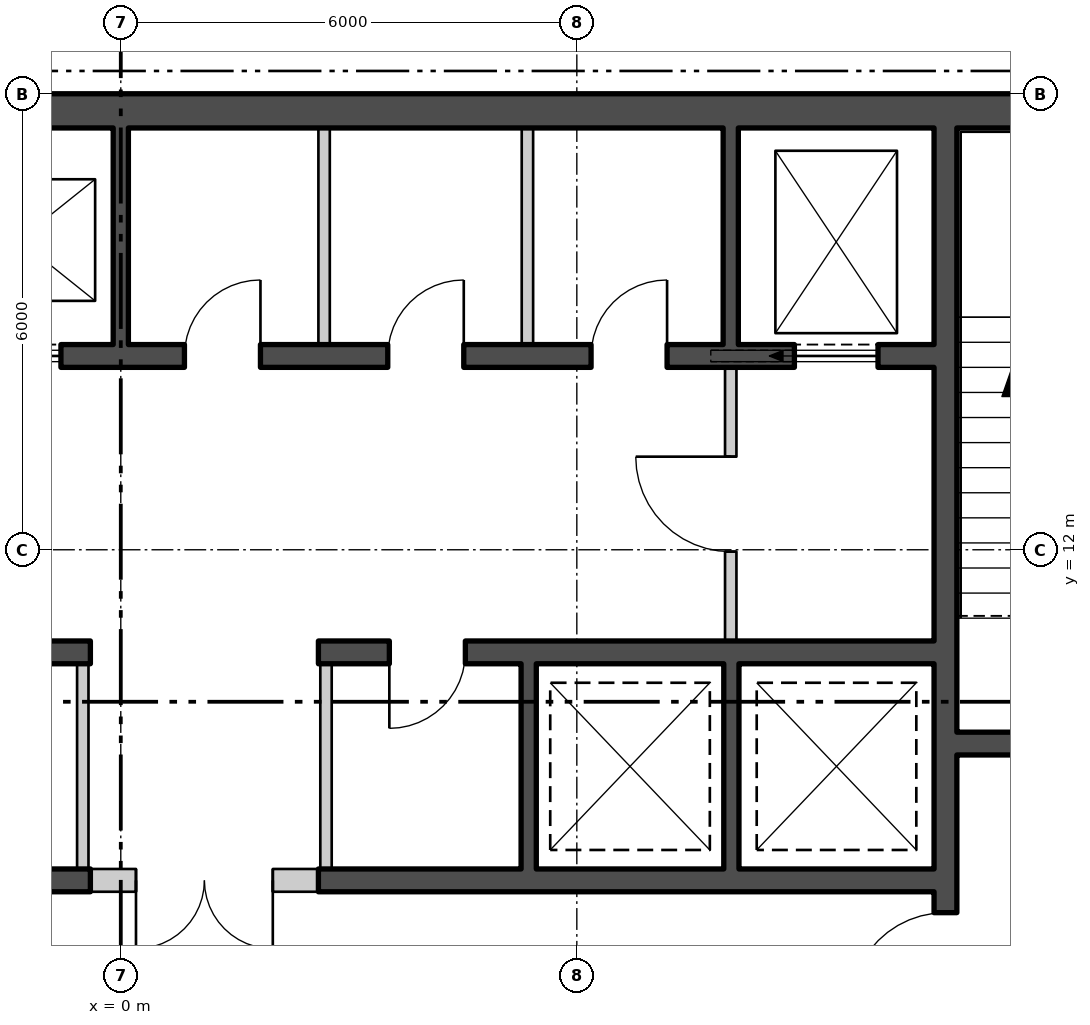
"""IFC4 building model, lengths in metres.
Left out: names, types, materials, properties, quantities, classifications, styles, units other than length and angle.
Written with IfcOpenShell. Run it as: python <this file> out.ifc"""

import sys

from ifc_helpers import new_model, si_unit, direction, frame, frame_2d, origin, place, context, subcontext, project, spatial, polyline, rectangle, outline, extrude, element, fill, save


model = new_model("IFC4")
c1 = context("Model", 3, precision=1e-05, world=origin(), true_north=direction((0.0, 1.0)))
c2 = subcontext(c1, "Body", "Model", "MODEL_VIEW")
j1 = project(units=[si_unit("LENGTHUNIT", "METRE"), si_unit("PLANEANGLEUNIT", "RADIAN")], contexts=[c1])
p1 = place(None, origin())
s1 = spatial("IfcSite", under=j1, at=p1, CompositionType="ELEMENT")
p2 = place(p1, origin())
s2 = spatial("IfcBuilding", under=s1, at=p2, CompositionType="ELEMENT")
p3 = place(p2, frame((0.0, 0.0, 192.6)))
s3 = spatial("IfcBuildingStorey", under=s2, at=p3, CompositionType="ELEMENT", Elevation=192.6)
p4 = place(p3, frame((3.67, -25.994, -0.18), z_axis=(0.0, 0.0, 1.0), x_axis=(0.499999764979, 0.866025539474, 0.0)))
e1 = element("IfcWall", 1, at=p4, inside=s3, PredefinedType="SOLIDWALL", context=c2, shape_type="SweptSolid", body=[
    extrude(outline(polyline([(-0.13, -0.225), (45.87, -0.225), (45.61, 0.225), (0.13, 0.225), (-0.13, -0.225)])), origin(), (0.0, 0.0, 1.0), 3.68),
])
p5 = place(p4, frame((1.424, 0.0, 1.08)))
e2 = element("IfcOpeningElement", 2, at=p5, cuts=e1, PredefinedType="OPENING", context=c2, shape_type="SweptSolid", body=[
    extrude(rectangle(XDim=2.4, YDim=2.0, at=frame_2d((1.2, 1.0))), frame((0.0, 0.235, 0.0), z_axis=(0.0, -1.0, 0.0), x_axis=(1.0, 0.0, 0.0)), (0.0, 0.0, 1.0), 0.47),
])
p6 = place(p4, frame((5.893, 0.0, 1.08)))
e3 = element("IfcOpeningElement", 3, at=p6, cuts=e1, PredefinedType="OPENING", context=c2, shape_type="SweptSolid", body=[
    extrude(rectangle(XDim=2.4, YDim=2.0, at=frame_2d((1.2, 1.0))), frame((0.0, 0.235, 0.0), z_axis=(0.0, -1.0, 0.0), x_axis=(1.0, 0.0, 0.0)), (0.0, 0.0, 1.0), 0.47),
])
p7 = place(p4, frame((10.401, 0.0, 1.08)))
e4 = element("IfcOpeningElement", 4, at=p7, cuts=e1, PredefinedType="OPENING", context=c2, shape_type="SweptSolid", body=[
    extrude(rectangle(XDim=2.4, YDim=2.0, at=frame_2d((1.2, 1.0))), frame((0.0, 0.235, 0.0), z_axis=(0.0, -1.0, 0.0), x_axis=(1.0, 0.0, 0.0)), (0.0, 0.0, 1.0), 0.47),
])
p8 = place(p4, frame((14.909, 0.0, 1.08)))
e5 = element("IfcOpeningElement", 5, at=p8, cuts=e1, PredefinedType="OPENING", context=c2, shape_type="SweptSolid", body=[
    extrude(rectangle(XDim=2.4, YDim=2.0, at=frame_2d((1.2, 1.0))), frame((0.0, 0.235, 0.0), z_axis=(0.0, -1.0, 0.0), x_axis=(1.0, 0.0, 0.0)), (0.0, 0.0, 1.0), 0.47),
])
p9 = place(p4, frame((19.416, 0.0, 1.08)))
e6 = element("IfcOpeningElement", 6, at=p9, cuts=e1, PredefinedType="OPENING", context=c2, shape_type="SweptSolid", body=[
    extrude(rectangle(XDim=2.4, YDim=2.0, at=frame_2d((1.2, 1.0))), frame((0.0, 0.235, 0.0), z_axis=(0.0, -1.0, 0.0), x_axis=(1.0, 0.0, 0.0)), (0.0, 0.0, 1.0), 0.47),
])
p10 = place(p4, frame((23.924, 0.0, 1.08)))
e7 = element("IfcOpeningElement", 7, at=p10, cuts=e1, PredefinedType="OPENING", context=c2, shape_type="SweptSolid", body=[
    extrude(rectangle(XDim=2.4, YDim=2.0, at=frame_2d((1.2, 1.0))), frame((0.0, 0.235, 0.0), z_axis=(0.0, -1.0, 0.0), x_axis=(1.0, 0.0, 0.0)), (0.0, 0.0, 1.0), 0.47),
])
p11 = place(p4, frame((28.431, 0.0, 1.08)))
e8 = element("IfcOpeningElement", 8, at=p11, cuts=e1, PredefinedType="OPENING", context=c2, shape_type="SweptSolid", body=[
    extrude(rectangle(XDim=2.4, YDim=2.0, at=frame_2d((1.2, 1.0))), frame((0.0, 0.235, 0.0), z_axis=(0.0, -1.0, 0.0), x_axis=(1.0, 0.0, 0.0)), (0.0, 0.0, 1.0), 0.47),
])
p12 = place(p4, frame((32.939, 0.0, 1.08)))
e9 = element("IfcOpeningElement", 9, at=p12, cuts=e1, PredefinedType="OPENING", context=c2, shape_type="SweptSolid", body=[
    extrude(rectangle(XDim=2.4, YDim=2.0, at=frame_2d((1.2, 1.0))), frame((0.0, 0.235, 0.0), z_axis=(0.0, -1.0, 0.0), x_axis=(1.0, 0.0, 0.0)), (0.0, 0.0, 1.0), 0.47),
])
p13 = place(p4, frame((37.447, 0.0, 1.08)))
e10 = element("IfcOpeningElement", 10, at=p13, cuts=e1, PredefinedType="OPENING", context=c2, shape_type="SweptSolid", body=[
    extrude(rectangle(XDim=2.4, YDim=2.0, at=frame_2d((1.2, 1.0))), frame((0.0, 0.235, 0.0), z_axis=(0.0, -1.0, 0.0), x_axis=(1.0, 0.0, 0.0)), (0.0, 0.0, 1.0), 0.47),
])
p14 = place(p4, frame((41.916, 0.0, 1.08)))
e11 = element("IfcOpeningElement", 11, at=p14, cuts=e1, PredefinedType="OPENING", context=c2, shape_type="SweptSolid", body=[
    extrude(rectangle(XDim=2.4, YDim=2.0, at=frame_2d((1.2, 1.0))), frame((0.0, 0.235, 0.0), z_axis=(0.0, -1.0, 0.0), x_axis=(1.0, 0.0, 0.0)), (0.0, 0.0, 1.0), 0.47),
])
p15 = place(p3, frame((-16.2, 17.775, 0.0), z_axis=(0.0, 0.0, 1.0), x_axis=(1.0, 0.0, 0.0)))
e12 = element("IfcWall", 12, at=p15, inside=s3, PredefinedType="SHEAR", context=c2, shape_type="SweptSolid", body=[
    extrude(rectangle(XDim=32.4, YDim=0.45, at=frame_2d((16.2, 0.0))), origin(), (0.0, 0.0, 1.0), 3.7),
])
p16 = place(p3, frame((10.85, 2.45, 0.0), z_axis=(0.0, 0.0, 1.0), x_axis=(0.0, 1.0, 0.0)))
e13 = element("IfcWall", 13, at=p16, inside=s3, PredefinedType="SHEAR", context=c2, shape_type="SweptSolid", body=[
    extrude(rectangle(XDim=15.1, YDim=0.3, at=frame_2d((7.55, 0.0))), origin(), (0.0, 0.0, 1.0), 3.7),
])
p17 = place(p16, frame((3.525, 0.0, 0.0)))
e14 = element("IfcOpeningElement", 14, at=p17, cuts=e13, PredefinedType="OPENING", context=c2, shape_type="SweptSolid", body=[
    extrude(rectangle(XDim=1.25, YDim=2.1, at=frame_2d((0.625, 1.05))), frame((0.0, 0.16, 0.0), z_axis=(0.0, -1.0, 0.0), x_axis=(1.0, 0.0, 0.0)), (0.0, 0.0, 1.0), 0.32),
])
p18 = place(p16, frame((1.15, 0.0, 0.0)))
e15 = element("IfcOpeningElement", 15, at=p18, cuts=e13, PredefinedType="OPENING", context=c2, shape_type="SweptSolid", body=[
    extrude(rectangle(XDim=1.0, YDim=2.1, at=frame_2d((0.5, 1.05))), frame((0.0, 0.16, 0.0), z_axis=(0.0, -1.0, 0.0), x_axis=(1.0, 0.0, 0.0)), (0.0, 0.0, 1.0), 0.32),
])
p19 = place(p3, frame((11.0, 9.45, 0.0), z_axis=(0.0, 0.0, 1.0), x_axis=(1.0, 0.0, 0.0)))
e16 = element("IfcWall", 16, at=p19, inside=s3, PredefinedType="SHEAR", context=c2, shape_type="SweptSolid", body=[
    extrude(rectangle(XDim=3.2, YDim=0.3, at=frame_2d((1.6, 0.0))), origin(), (0.0, 0.0, 1.0), 3.7),
])
p20 = place(p19, frame((1.0, 0.0, 0.0)))
e17 = element("IfcOpeningElement", 17, at=p20, cuts=e16, PredefinedType="OPENING", context=c2, shape_type="SweptSolid", body=[
    extrude(rectangle(XDim=1.2, YDim=2.1, at=frame_2d((0.6, 1.05))), frame((0.0, 0.16, 0.0), z_axis=(0.0, -1.0, 0.0), x_axis=(1.0, 0.0, 0.0)), (0.0, 0.0, 1.0), 0.32),
])
p21 = place(p3, frame((-10.7, 14.55, 0.0), z_axis=(0.0, 0.0, 1.0), x_axis=(1.0, 0.0, 0.0)))
e18 = element("IfcWall", 18, at=p21, inside=s3, PredefinedType="SHEAR", context=c2, shape_type="SweptSolid", body=[
    extrude(rectangle(XDim=21.4, YDim=0.3, at=frame_2d((10.7, 0.0))), origin(), (0.0, 0.0, 1.0), 3.7),
])
p22 = place(p21, frame((0.738, 0.0, 0.0)))
e19 = element("IfcOpeningElement", 19, at=p22, cuts=e18, PredefinedType="OPENING", context=c2, shape_type="SweptSolid", body=[
    extrude(rectangle(XDim=1.1, YDim=2.1, at=frame_2d((0.55, 1.05))), frame((0.0, 0.16, 0.0), z_axis=(0.0, -1.0, 0.0), x_axis=(1.0, 0.0, 0.0)), (0.0, 0.0, 1.0), 0.32),
])
p23 = place(p21, frame((3.462, 0.0, 0.0)))
e20 = element("IfcOpeningElement", 20, at=p23, cuts=e18, PredefinedType="OPENING", context=c2, shape_type="SweptSolid", body=[
    extrude(rectangle(XDim=1.1, YDim=2.1, at=frame_2d((0.55, 1.05))), frame((0.0, 0.16, 0.0), z_axis=(0.0, -1.0, 0.0), x_axis=(1.0, 0.0, 0.0)), (0.0, 0.0, 1.0), 0.32),
])
p24 = place(p21, frame((6.138, 0.0, 0.0)))
e21 = element("IfcOpeningElement", 21, at=p24, cuts=e18, PredefinedType="OPENING", context=c2, shape_type="SweptSolid", body=[
    extrude(rectangle(XDim=1.1, YDim=2.1, at=frame_2d((0.55, 1.05))), frame((0.0, 0.16, 0.0), z_axis=(0.0, -1.0, 0.0), x_axis=(1.0, 0.0, 0.0)), (0.0, 0.0, 1.0), 0.32),
])
p25 = place(p21, frame((8.812, 0.0, 0.0)))
e22 = element("IfcOpeningElement", 22, at=p25, cuts=e18, PredefinedType="OPENING", context=c2, shape_type="SweptSolid", body=[
    extrude(rectangle(XDim=1.1, YDim=2.1, at=frame_2d((0.55, 1.05))), frame((0.0, 0.16, 0.0), z_axis=(0.0, -1.0, 0.0), x_axis=(1.0, 0.0, 0.0)), (0.0, 0.0, 1.0), 0.32),
])
p26 = place(p21, frame((19.562, 0.0, 0.0)))
e23 = element("IfcOpeningElement", 23, at=p26, cuts=e18, PredefinedType="OPENING", context=c2, shape_type="SweptSolid", body=[
    extrude(rectangle(XDim=1.1, YDim=2.1, at=frame_2d((0.55, 1.05))), frame((0.0, 0.16, 0.0), z_axis=(0.0, -1.0, 0.0), x_axis=(1.0, 0.0, 0.0)), (0.0, 0.0, 1.0), 0.32),
])
p27 = place(p21, frame((11.537, 0.0, 0.0)))
e24 = element("IfcOpeningElement", 24, at=p27, cuts=e18, PredefinedType="OPENING", context=c2, shape_type="SweptSolid", body=[
    extrude(rectangle(XDim=1.0, YDim=2.1, at=frame_2d((0.5, 1.05))), frame((0.0, 0.16, 0.0), z_axis=(0.0, -1.0, 0.0), x_axis=(1.0, 0.0, 0.0)), (0.0, 0.0, 1.0), 0.32),
])
p28 = place(p21, frame((14.213, 0.0, 0.0)))
e25 = element("IfcOpeningElement", 25, at=p28, cuts=e18, PredefinedType="OPENING", context=c2, shape_type="SweptSolid", body=[
    extrude(rectangle(XDim=1.0, YDim=2.1, at=frame_2d((0.5, 1.05))), frame((0.0, 0.16, 0.0), z_axis=(0.0, -1.0, 0.0), x_axis=(1.0, 0.0, 0.0)), (0.0, 0.0, 1.0), 0.32),
])
p29 = place(p21, frame((16.887, 0.0, 0.0)))
e26 = element("IfcOpeningElement", 26, at=p29, cuts=e18, PredefinedType="OPENING", context=c2, shape_type="SweptSolid", body=[
    extrude(rectangle(XDim=1.0, YDim=2.1, at=frame_2d((0.5, 1.05))), frame((0.0, 0.16, 0.0), z_axis=(0.0, -1.0, 0.0), x_axis=(1.0, 0.0, 0.0)), (0.0, 0.0, 1.0), 0.32),
])
p30 = place(p3, frame((-10.7, 10.65, 0.0), z_axis=(0.0, 0.0, 1.0), x_axis=(1.0, 0.0, 0.0)))
e27 = element("IfcWall", 27, at=p30, inside=s3, PredefinedType="SHEAR", context=c2, shape_type="SweptSolid", body=[
    extrude(rectangle(XDim=10.3, YDim=0.3, at=frame_2d((5.15, 0.0))), origin(), (0.0, 0.0, 1.0), 3.7),
])
p31 = place(p30, frame((0.675, 0.0, 0.0)))
e28 = element("IfcOpeningElement", 28, at=p31, cuts=e27, PredefinedType="OPENING", context=c2, shape_type="SweptSolid", body=[
    extrude(rectangle(XDim=1.1, YDim=2.1, at=frame_2d((0.55, 1.05))), frame((0.0, 0.16, 0.0), z_axis=(0.0, -1.0, 0.0), x_axis=(1.0, 0.0, 0.0)), (0.0, 0.0, 1.0), 0.32),
])
p32 = place(p30, frame((3.275, 0.0, 0.0)))
e29 = element("IfcOpeningElement", 29, at=p32, cuts=e27, PredefinedType="OPENING", context=c2, shape_type="SweptSolid", body=[
    extrude(rectangle(XDim=1.1, YDim=2.1, at=frame_2d((0.55, 1.05))), frame((0.0, 0.16, 0.0), z_axis=(0.0, -1.0, 0.0), x_axis=(1.0, 0.0, 0.0)), (0.0, 0.0, 1.0), 0.32),
])
p33 = place(p30, frame((5.825, 0.0, 0.0)))
e30 = element("IfcOpeningElement", 30, at=p33, cuts=e27, PredefinedType="OPENING", context=c2, shape_type="SweptSolid", body=[
    extrude(rectangle(XDim=1.1, YDim=2.1, at=frame_2d((0.55, 1.05))), frame((0.0, 0.16, 0.0), z_axis=(0.0, -1.0, 0.0), x_axis=(1.0, 0.0, 0.0)), (0.0, 0.0, 1.0), 0.32),
])
p34 = place(p30, frame((8.425, 0.0, 0.0)))
e31 = element("IfcOpeningElement", 31, at=p34, cuts=e27, PredefinedType="OPENING", context=c2, shape_type="SweptSolid", body=[
    extrude(rectangle(XDim=1.0, YDim=2.1, at=frame_2d((0.5, 1.05))), frame((0.0, 0.16, 0.0), z_axis=(0.0, -1.0, 0.0), x_axis=(1.0, 0.0, 0.0)), (0.0, 0.0, 1.0), 0.32),
])
p35 = place(p3, frame((-10.7, 7.65, 0.0), z_axis=(0.0, 0.0, 1.0), x_axis=(1.0, 0.0, 0.0)))
e32 = element("IfcWall", 32, at=p35, inside=s3, PredefinedType="SHEAR", context=c2, shape_type="SweptSolid", body=[
    extrude(rectangle(XDim=10.3, YDim=0.3, at=frame_2d((5.15, 0.0))), origin(), (0.0, 0.0, 1.0), 3.7),
])
p36 = place(p3, frame((2.6, 10.65, 0.0), z_axis=(0.0, 0.0, 1.0), x_axis=(1.0, 0.0, 0.0)))
e33 = element("IfcWall", 33, at=p36, inside=s3, PredefinedType="SHEAR", context=c2, shape_type="SweptSolid", body=[
    extrude(rectangle(XDim=8.1, YDim=0.3, at=frame_2d((4.05, 0.0))), origin(), (0.0, 0.0, 1.0), 3.7),
])
p37 = place(p36, frame((0.933, 0.0, 0.0)))
e34 = element("IfcOpeningElement", 34, at=p37, cuts=e33, PredefinedType="OPENING", context=c2, shape_type="SweptSolid", body=[
    extrude(rectangle(XDim=1.0, YDim=2.1, at=frame_2d((0.5, 1.05))), frame((0.0, 0.16, 0.0), z_axis=(0.0, -1.0, 0.0), x_axis=(1.0, 0.0, 0.0)), (0.0, 0.0, 1.0), 0.32),
])
p38 = place(p3, frame((2.6, 7.65, 0.0), z_axis=(0.0, 0.0, 1.0), x_axis=(1.0, 0.0, 0.0)))
e35 = element("IfcWall", 35, at=p38, inside=s3, PredefinedType="SHEAR", context=c2, shape_type="SweptSolid", body=[
    extrude(rectangle(XDim=8.1, YDim=0.3, at=frame_2d((4.05, 0.0))), origin(), (0.0, 0.0, 1.0), 3.7),
])
p39 = place(p3, frame((0.0, 14.7, 0.0), z_axis=(0.0, 0.0, 1.0), x_axis=(0.0, 1.0, 0.0)))
e36 = element("IfcWall", 36, at=p39, inside=s3, PredefinedType="SHEAR", context=c2, shape_type="SweptSolid", body=[
    extrude(rectangle(XDim=2.85, YDim=0.2, at=frame_2d((1.425, 0.0))), origin(), (0.0, 0.0, 1.0), 3.7),
])
for number, where, z_axis, x_axis in (
    (37, (2.675, 14.7, 0.0), (0.0, 0.0, 1.0), (0.0, 1.0, 0.0)),
    (38, (5.35, 14.7, 0.0), (0.0, 0.0, 1.0), (0.0, 1.0, 0.0)),
):
    element("IfcWall", number, at=place(p3, frame(where, z_axis=z_axis, x_axis=x_axis)), inside=s3, PredefinedType="PARTITIONING", context=c2, shape_type="SweptSolid", body=[
        extrude(rectangle(XDim=2.85, YDim=0.15, at=frame_2d((1.425, 0.0))), origin(), (0.0, 0.0, 1.0), 3.7),
    ])
p40 = place(p3, frame((8.025, 14.7, 0.0), z_axis=(0.0, 0.0, 1.0), x_axis=(0.0, 1.0, 0.0)))
e39 = element("IfcWall", 39, at=p40, inside=s3, PredefinedType="SHEAR", context=c2, shape_type="SweptSolid", body=[
    extrude(rectangle(XDim=2.85, YDim=0.2, at=frame_2d((1.425, 0.0))), origin(), (0.0, 0.0, 1.0), 3.7),
])
for number, where, z_axis, x_axis in (
    (40, (-0.5, 7.8, 0.0), (0.0, 0.0, 1.0), (0.0, 1.0, 0.0)),
    (41, (2.7, 7.8, 0.0), (0.0, 0.0, 1.0), (0.0, 1.0, 0.0)),
):
    element("IfcWall", number, at=place(p3, frame(where, z_axis=z_axis, x_axis=x_axis)), inside=s3, PredefinedType="PARTITIONING", context=c2, shape_type="SweptSolid", body=[
        extrude(rectangle(XDim=2.7, YDim=0.15, at=frame_2d((1.35, 0.0))), origin(), (0.0, 0.0, 1.0), 3.7),
    ])
for number, where, z_axis, x_axis in (
    (42, (5.367, 7.8, 0.0), (0.0, 0.0, 1.0), (0.0, 1.0, 0.0)),
    (43, (8.033, 7.8, 0.0), (0.0, 0.0, 1.0), (0.0, 1.0, 0.0)),
):
    element("IfcWall", number, at=place(p3, frame(where, z_axis=z_axis, x_axis=x_axis)), inside=s3, PredefinedType="SHEAR", context=c2, shape_type="SweptSolid", body=[
        extrude(rectangle(XDim=2.7, YDim=0.2, at=frame_2d((1.35, 0.0))), origin(), (0.0, 0.0, 1.0), 3.7),
    ])
p41 = place(p3, frame((8.025, 10.8, 0.0), z_axis=(0.0, 0.0, 1.0), x_axis=(0.0, 1.0, 0.0)))
e44 = element("IfcWall", 44, at=p41, inside=s3, PredefinedType="PARTITIONING", context=c2, shape_type="SweptSolid", body=[
    extrude(rectangle(XDim=3.6, YDim=0.15, at=frame_2d((1.8, 0.0))), origin(), (0.0, 0.0, 1.0), 3.7),
])
p42 = place(p41, frame((1.175, 0.0, 0.0)))
e45 = element("IfcOpeningElement", 45, at=p42, cuts=e44, PredefinedType="OPENING", context=c2, shape_type="SweptSolid", body=[
    extrude(rectangle(XDim=1.25, YDim=2.1, at=frame_2d((0.625, 1.05))), frame((0.0, 0.085, 0.0), z_axis=(0.0, -1.0, 0.0), x_axis=(1.0, 0.0, 0.0)), (0.0, 0.0, 1.0), 0.17),
])
p43 = place(p3, frame((-0.4, 7.65, 0.0), z_axis=(0.0, 0.0, 1.0), x_axis=(1.0, 0.0, 0.0)))
e46 = element("IfcWall", 46, at=p43, inside=s3, PredefinedType="PARTITIONING", context=c2, shape_type="SweptSolid", body=[
    extrude(rectangle(XDim=3.0, YDim=0.3, at=frame_2d((1.5, 0.0))), origin(), (0.0, 0.0, 1.0), 3.7),
])
p44 = place(p43, frame((0.6, 0.0, 0.0)))
e47 = element("IfcOpeningElement", 47, at=p44, cuts=e46, PredefinedType="OPENING", context=c2, shape_type="SweptSolid", body=[
    extrude(rectangle(XDim=1.8, YDim=2.4, at=frame_2d((0.9, 1.2))), frame((0.0, 0.16, 0.0), z_axis=(0.0, -1.0, 0.0), x_axis=(1.0, 0.0, 0.0)), (0.0, 0.0, 1.0), 0.32),
])
p45 = place(p25, origin())
e48 = element("IfcDoor", 48, at=p45, inside=s3, OperationType="SLIDING_TO_LEFT", PredefinedType="DOOR", context=c2, shape_type="SweptSolid", body=[
    extrude(rectangle(XDim=1.1, YDim=2.1, at=frame_2d((0.55, 1.05))), frame((0.0, 0.025, 0.0), z_axis=(0.0, -1.0, 0.0), x_axis=(1.0, 0.0, 0.0)), (0.0, 0.0, 1.0), 0.05),
])
fill(e22, e48)
p46 = place(p26, origin())
e49 = element("IfcDoor", 49, at=p46, inside=s3, OperationType="SLIDING_TO_LEFT", PredefinedType="DOOR", context=c2, shape_type="SweptSolid", body=[
    extrude(rectangle(XDim=1.1, YDim=2.1, at=frame_2d((0.55, 1.05))), frame((0.0, 0.025, 0.0), z_axis=(0.0, -1.0, 0.0), x_axis=(1.0, 0.0, 0.0)), (0.0, 0.0, 1.0), 0.05),
])
fill(e23, e49)
p47 = place(p27, origin())
e50 = element("IfcDoor", 50, at=p47, inside=s3, OperationType="SINGLE_SWING_LEFT", PredefinedType="DOOR", context=c2, shape_type="SweptSolid", body=[
    extrude(rectangle(XDim=1.0, YDim=2.1, at=frame_2d((0.5, 1.05))), frame((0.0, 0.025, 0.0), z_axis=(0.0, -1.0, 0.0), x_axis=(1.0, 0.0, 0.0)), (0.0, 0.0, 1.0), 0.05),
])
fill(e24, e50)
p48 = place(p28, origin())
e51 = element("IfcDoor", 51, at=p48, inside=s3, OperationType="SINGLE_SWING_LEFT", PredefinedType="DOOR", context=c2, shape_type="SweptSolid", body=[
    extrude(rectangle(XDim=1.0, YDim=2.1, at=frame_2d((0.5, 1.05))), frame((0.0, 0.025, 0.0), z_axis=(0.0, -1.0, 0.0), x_axis=(1.0, 0.0, 0.0)), (0.0, 0.0, 1.0), 0.05),
])
fill(e25, e51)
p49 = place(p29, origin())
e52 = element("IfcDoor", 52, at=p49, inside=s3, OperationType="SINGLE_SWING_LEFT", PredefinedType="DOOR", context=c2, shape_type="SweptSolid", body=[
    extrude(rectangle(XDim=1.0, YDim=2.1, at=frame_2d((0.5, 1.05))), frame((0.0, 0.025, 0.0), z_axis=(0.0, -1.0, 0.0), x_axis=(1.0, 0.0, 0.0)), (0.0, 0.0, 1.0), 0.05),
])
fill(e26, e52)
p50 = place(p37, origin())
e53 = element("IfcDoor", 53, at=p50, inside=s3, OperationType="SINGLE_SWING_LEFT", PredefinedType="DOOR", context=c2, shape_type="SweptSolid", body=[
    extrude(rectangle(XDim=1.0, YDim=2.1, at=frame_2d((0.5, 1.05))), frame((0.0, 0.025, 0.0), z_axis=(0.0, -1.0, 0.0), x_axis=(1.0, 0.0, 0.0)), (0.0, 0.0, 1.0), 0.05),
])
fill(e34, e53)
p51 = place(p42, origin())
e54 = element("IfcDoor", 54, at=p51, inside=s3, OperationType="SINGLE_SWING_LEFT", PredefinedType="DOOR", context=c2, shape_type="SweptSolid", body=[
    extrude(rectangle(XDim=1.25, YDim=2.1, at=frame_2d((0.625, 1.05))), frame((0.0, 0.025, 0.0), z_axis=(0.0, -1.0, 0.0), x_axis=(1.0, 0.0, 0.0)), (0.0, 0.0, 1.0), 0.05),
])
fill(e45, e54)
p52 = place(p17, origin())
e55 = element("IfcDoor", 55, at=p52, inside=s3, OperationType="SINGLE_SWING_RIGHT", PredefinedType="DOOR", context=c2, shape_type="SweptSolid", body=[
    extrude(rectangle(XDim=1.25, YDim=2.1, at=frame_2d((0.625, 1.05))), frame((0.0, 0.025, 0.0), z_axis=(0.0, -1.0, 0.0), x_axis=(1.0, 0.0, 0.0)), (0.0, 0.0, 1.0), 0.05),
])
fill(e14, e55)
p53 = place(p44, origin())
e56 = element("IfcDoor", 56, at=p53, inside=s3, OperationType="DOUBLE_DOOR_SINGLE_SWING", PredefinedType="DOOR", context=c2, shape_type="SweptSolid", body=[
    extrude(rectangle(XDim=1.8, YDim=2.4, at=frame_2d((0.9, 1.2))), frame((0.0, 0.025, 0.0), z_axis=(0.0, -1.0, 0.0), x_axis=(1.0, 0.0, 0.0)), (0.0, 0.0, 1.0), 0.05),
])
fill(e47, e56)
save(model, sys.argv[1])
